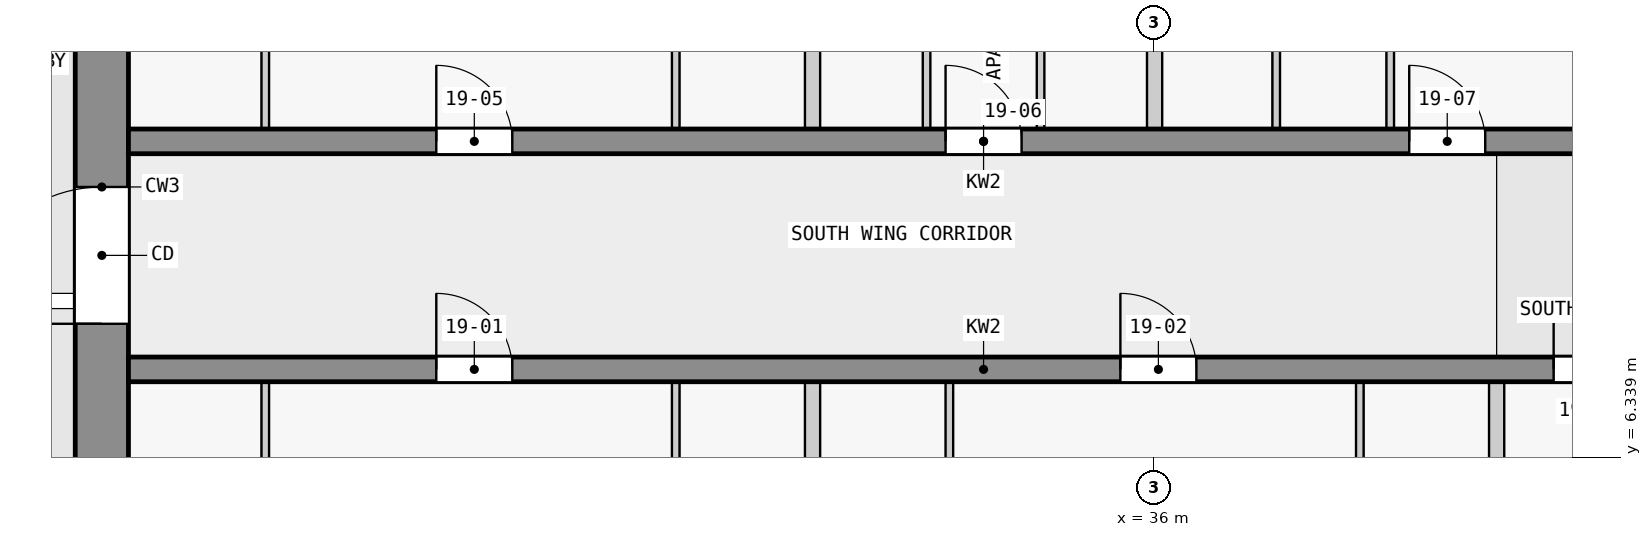
"""IFC4 building model, lengths in metres.
Left out: names, types, materials, properties, quantities, classifications, styles, units other than length and angle.
Written with IfcOpenShell. Run it as: python <this file> out.ifc"""

import sys

from ifc_helpers import new_model, si_unit, direction, frame, frame_2d, origin, place, context, subcontext, project, spatial, rectangle, extrude, element, fill, save


model = new_model("IFC4")
c1 = context("Model", 3, precision=1e-05, world=origin(), true_north=direction((0.0, 1.0)))
c2 = subcontext(c1, "Body", "Model", "MODEL_VIEW")
j1 = project(units=[si_unit("LENGTHUNIT", "METRE"), si_unit("PLANEANGLEUNIT", "RADIAN")], contexts=[c1])
p1 = place(None, origin())
s1 = spatial("IfcSite", under=j1, at=p1, CompositionType="ELEMENT")
p2 = place(p1, origin())
s2 = spatial("IfcBuilding", under=s1, at=p2, CompositionType="ELEMENT")
p3 = place(p2, frame((0.0, 0.0, 78.3)))
s3 = spatial("IfcBuildingStorey", under=s2, at=p3, CompositionType="ELEMENT", Elevation=78.3)
p4 = place(p3, frame((22.15, 2.5, 0.0), z_axis=(0.0, 0.0, 1.0), x_axis=(0.0, 1.0, 0.0)))
e1 = element("IfcWall", 1, at=p4, inside=s3, PredefinedType="SHEAR", context=c2, shape_type="SweptSolid", body=[
    extrude(rectangle(XDim=14.8, YDim=0.7, at=frame_2d((7.4, 0.0))), origin(), (0.0, 0.0, 1.0), 3.25),
])
p5 = place(p4, frame((5.6, 0.0, 0.0)))
e2 = element("IfcOpeningElement", 2, at=p5, cuts=e1, PredefinedType="OPENING", context=c2, shape_type="SweptSolid", body=[
    extrude(rectangle(XDim=1.8, YDim=2.1, at=frame_2d((0.9, 1.05))), frame((0.0, 0.36, 0.0), z_axis=(0.0, -1.0, 0.0), x_axis=(1.0, 0.0, 0.0)), (0.0, 0.0, 1.0), 0.72),
])
p6 = place(p3, frame((22.5, 7.5, 0.0), z_axis=(0.0, 0.0, 1.0), x_axis=(1.0, 0.0, 0.0)))
e3 = element("IfcWall", 3, at=p6, inside=s3, PredefinedType="SHEAR", context=c2, shape_type="SweptSolid", body=[
    extrude(rectangle(XDim=22.5, YDim=0.325, at=frame_2d((11.25, 0.0))), origin(), (0.0, 0.0, 1.0), 3.25),
])
p7 = place(p6, frame((4.05, 0.0, 0.0)))
e4 = element("IfcOpeningElement", 4, at=p7, cuts=e3, PredefinedType="OPENING", context=c2, shape_type="SweptSolid", body=[
    extrude(rectangle(XDim=1.0, YDim=2.1, at=frame_2d((0.5, 1.05))), frame((0.0, 0.172, 0.0), z_axis=(0.0, -1.0, 0.0), x_axis=(1.0, 0.0, 0.0)), (0.0, 0.0, 1.0), 0.345),
])
p8 = place(p6, frame((13.05, 0.0, 0.0)))
e5 = element("IfcOpeningElement", 5, at=p8, cuts=e3, PredefinedType="OPENING", context=c2, shape_type="SweptSolid", body=[
    extrude(rectangle(XDim=1.0, YDim=2.1, at=frame_2d((0.5, 1.05))), frame((0.0, 0.172, 0.0), z_axis=(0.0, -1.0, 0.0), x_axis=(1.0, 0.0, 0.0)), (0.0, 0.0, 1.0), 0.345),
])
p9 = place(p6, frame((18.75, 0.0, 0.0)))
e6 = element("IfcOpeningElement", 6, at=p9, cuts=e3, PredefinedType="OPENING", context=c2, shape_type="SweptSolid", body=[
    extrude(rectangle(XDim=0.9, YDim=2.1, at=frame_2d((0.45, 1.05))), frame((0.0, 0.172, 0.0), z_axis=(0.0, -1.0, 0.0), x_axis=(1.0, 0.0, 0.0)), (0.0, 0.0, 1.0), 0.345),
])
p10 = place(p6, frame((20.95, 0.0, 0.0)))
e7 = element("IfcOpeningElement", 7, at=p10, cuts=e3, PredefinedType="OPENING", context=c2, shape_type="SweptSolid", body=[
    extrude(rectangle(XDim=1.0, YDim=2.1, at=frame_2d((0.5, 1.05))), frame((0.0, 0.172, 0.0), z_axis=(0.0, -1.0, 0.0), x_axis=(1.0, 0.0, 0.0)), (0.0, 0.0, 1.0), 0.345),
])
p11 = place(p3, frame((22.5, 10.5, 0.0), z_axis=(0.0, 0.0, 1.0), x_axis=(1.0, 0.0, 0.0)))
e8 = element("IfcWall", 8, at=p11, inside=s3, PredefinedType="SHEAR", context=c2, shape_type="SweptSolid", body=[
    extrude(rectangle(XDim=22.5, YDim=0.325, at=frame_2d((11.25, 0.0))), origin(), (0.0, 0.0, 1.0), 3.25),
])
p12 = place(p11, frame((4.05, 0.0, 0.0)))
e9 = element("IfcOpeningElement", 9, at=p12, cuts=e8, PredefinedType="OPENING", context=c2, shape_type="SweptSolid", body=[
    extrude(rectangle(XDim=1.0, YDim=2.1, at=frame_2d((0.5, 1.05))), frame((0.0, 0.172, 0.0), z_axis=(0.0, -1.0, 0.0), x_axis=(1.0, 0.0, 0.0)), (0.0, 0.0, 1.0), 0.345),
])
p13 = place(p11, frame((10.75, 0.0, 0.0)))
e10 = element("IfcOpeningElement", 10, at=p13, cuts=e8, PredefinedType="OPENING", context=c2, shape_type="SweptSolid", body=[
    extrude(rectangle(XDim=1.0, YDim=2.1, at=frame_2d((0.5, 1.05))), frame((0.0, 0.172, 0.0), z_axis=(0.0, -1.0, 0.0), x_axis=(1.0, 0.0, 0.0)), (0.0, 0.0, 1.0), 0.345),
])
p14 = place(p11, frame((16.85, 0.0, 0.0)))
e11 = element("IfcOpeningElement", 11, at=p14, cuts=e8, PredefinedType="OPENING", context=c2, shape_type="SweptSolid", body=[
    extrude(rectangle(XDim=1.0, YDim=2.1, at=frame_2d((0.5, 1.05))), frame((0.0, 0.172, 0.0), z_axis=(0.0, -1.0, 0.0), x_axis=(1.0, 0.0, 0.0)), (0.0, 0.0, 1.0), 0.345),
])
p15 = place(p3, frame((24.3, 3.938, 0.0), z_axis=(0.0, 0.0, 1.0), x_axis=(0.0, 1.0, 0.0)))
e12 = element("IfcWall", 12, at=p15, inside=s3, PredefinedType="PARTITIONING", context=c2, shape_type="SweptSolid", body=[
    extrude(rectangle(XDim=3.4, YDim=0.1, at=frame_2d((1.7, 0.0))), origin(), (0.0, 0.0, 1.0), 3.25),
])
p16 = place(p15, frame((1.25, 0.0, 0.0)))
e13 = element("IfcOpeningElement", 13, at=p16, cuts=e12, PredefinedType="OPENING", context=c2, shape_type="SweptSolid", body=[
    extrude(rectangle(XDim=0.9, YDim=2.1, at=frame_2d((0.45, 1.05))), frame((0.0, 0.06, 0.0), z_axis=(0.0, -1.0, 0.0), x_axis=(1.0, 0.0, 0.0)), (0.0, 0.0, 1.0), 0.12),
])
p17 = place(p3, frame((24.3, 10.663, 0.0), z_axis=(0.0, 0.0, 1.0), x_axis=(0.0, 1.0, 0.0)))
e14 = element("IfcWall", 14, at=p17, inside=s3, PredefinedType="PARTITIONING", context=c2, shape_type="SweptSolid", body=[
    extrude(rectangle(XDim=3.4, YDim=0.1, at=frame_2d((1.7, 0.0))), origin(), (0.0, 0.0, 1.0), 3.25),
])
p18 = place(p17, frame((1.25, 0.0, 0.0)))
e15 = element("IfcOpeningElement", 15, at=p18, cuts=e14, PredefinedType="OPENING", context=c2, shape_type="SweptSolid", body=[
    extrude(rectangle(XDim=0.9, YDim=2.1, at=frame_2d((0.45, 1.05))), frame((0.0, 0.06, 0.0), z_axis=(0.0, -1.0, 0.0), x_axis=(1.0, 0.0, 0.0)), (0.0, 0.0, 1.0), 0.12),
])
p19 = place(p3, frame((29.7, 7.337, 0.0), z_axis=(0.0, 0.0, 1.0), x_axis=(0.0, -1.0, 0.0)))
e16 = element("IfcWall", 16, at=p19, inside=s3, PredefinedType="PARTITIONING", context=c2, shape_type="SweptSolid", body=[
    extrude(rectangle(XDim=3.35, YDim=0.1, at=frame_2d((1.675, 0.0))), origin(), (0.0, 0.0, 1.0), 3.25),
])
p20 = place(p19, frame((1.25, 0.0, 0.0)))
e17 = element("IfcOpeningElement", 17, at=p20, cuts=e16, PredefinedType="OPENING", context=c2, shape_type="SweptSolid", body=[
    extrude(rectangle(XDim=0.9, YDim=2.1, at=frame_2d((0.45, 1.05))), frame((0.0, 0.06, 0.0), z_axis=(0.0, -1.0, 0.0), x_axis=(1.0, 0.0, 0.0)), (0.0, 0.0, 1.0), 0.12),
])
p21 = place(p3, frame((29.7, 14.062, 0.0), z_axis=(0.0, 0.0, 1.0), x_axis=(0.0, -1.0, 0.0)))
e18 = element("IfcWall", 18, at=p21, inside=s3, PredefinedType="PARTITIONING", context=c2, shape_type="SweptSolid", body=[
    extrude(rectangle(XDim=3.4, YDim=0.1, at=frame_2d((1.7, 0.0))), origin(), (0.0, 0.0, 1.0), 3.25),
])
p22 = place(p21, frame((1.25, 0.0, 0.0)))
e19 = element("IfcOpeningElement", 19, at=p22, cuts=e18, PredefinedType="OPENING", context=c2, shape_type="SweptSolid", body=[
    extrude(rectangle(XDim=0.9, YDim=2.1, at=frame_2d((0.45, 1.05))), frame((0.0, 0.06, 0.0), z_axis=(0.0, -1.0, 0.0), x_axis=(1.0, 0.0, 0.0)), (0.0, 0.0, 1.0), 0.12),
])
for number, where, z_axis, x_axis in (
    (20, (31.5, 3.938, 0.0), (0.0, 0.0, 1.0), (0.0, 1.0, 0.0)),
    (21, (31.5, 10.663, 0.0), (0.0, 0.0, 1.0), (0.0, 1.0, 0.0)),
):
    element("IfcWall", number, at=place(p3, frame(where, z_axis=z_axis, x_axis=x_axis)), inside=s3, PredefinedType="PARTITIONING", context=c2, shape_type="SweptSolid", body=[
        extrude(rectangle(XDim=3.4, YDim=0.2, at=frame_2d((1.7, 0.0))), origin(), (0.0, 0.0, 1.0), 3.25),
    ])
p23 = place(p3, frame((33.0, 10.663, 0.0), z_axis=(0.0, 0.0, 1.0), x_axis=(0.0, 1.0, 0.0)))
e22 = element("IfcWall", 22, at=p23, inside=s3, PredefinedType="PARTITIONING", context=c2, shape_type="SweptSolid", body=[
    extrude(rectangle(XDim=3.4, YDim=0.1, at=frame_2d((1.7, 0.0))), origin(), (0.0, 0.0, 1.0), 3.25),
])
p24 = place(p23, frame((1.25, 0.0, 0.0)))
e23 = element("IfcOpeningElement", 23, at=p24, cuts=e22, PredefinedType="OPENING", context=c2, shape_type="SweptSolid", body=[
    extrude(rectangle(XDim=0.9, YDim=2.1, at=frame_2d((0.45, 1.05))), frame((0.0, 0.06, 0.0), z_axis=(0.0, -1.0, 0.0), x_axis=(1.0, 0.0, 0.0)), (0.0, 0.0, 1.0), 0.12),
])
p25 = place(p3, frame((33.3, 3.988, 0.0), z_axis=(0.0, 0.0, 1.0), x_axis=(0.0, 1.0, 0.0)))
e24 = element("IfcWall", 24, at=p25, inside=s3, PredefinedType="PARTITIONING", context=c2, shape_type="SweptSolid", body=[
    extrude(rectangle(XDim=3.35, YDim=0.1, at=frame_2d((1.675, 0.0))), origin(), (0.0, 0.0, 1.0), 3.25),
])
p26 = place(p25, frame((1.25, 0.0, 0.0)))
e25 = element("IfcOpeningElement", 25, at=p26, cuts=e24, PredefinedType="OPENING", context=c2, shape_type="SweptSolid", body=[
    extrude(rectangle(XDim=0.9, YDim=2.1, at=frame_2d((0.45, 1.05))), frame((0.0, 0.06, 0.0), z_axis=(0.0, -1.0, 0.0), x_axis=(1.0, 0.0, 0.0)), (0.0, 0.0, 1.0), 0.12),
])
p27 = place(p3, frame((34.5, 14.012, 0.0), z_axis=(0.0, 0.0, 1.0), x_axis=(0.0, -1.0, 0.0)))
e26 = element("IfcWall", 26, at=p27, inside=s3, PredefinedType="PARTITIONING", context=c2, shape_type="SweptSolid", body=[
    extrude(rectangle(XDim=3.35, YDim=0.1, at=frame_2d((1.675, 0.0))), origin(), (0.0, 0.0, 1.0), 3.25),
])
p28 = place(p27, frame((1.25, 0.0, 0.0)))
e27 = element("IfcOpeningElement", 27, at=p28, cuts=e26, PredefinedType="OPENING", context=c2, shape_type="SweptSolid", body=[
    extrude(rectangle(XDim=0.9, YDim=2.1, at=frame_2d((0.45, 1.05))), frame((0.0, 0.06, 0.0), z_axis=(0.0, -1.0, 0.0), x_axis=(1.0, 0.0, 0.0)), (0.0, 0.0, 1.0), 0.12),
])
p29 = place(p3, frame((36.0, 10.663, 0.0), z_axis=(0.0, 0.0, 1.0), x_axis=(0.0, 1.0, 0.0)))
e28 = element("IfcWall", 28, at=p29, inside=s3, PredefinedType="PARTITIONING", context=c2, shape_type="SweptSolid", body=[
    extrude(rectangle(XDim=3.4, YDim=0.2, at=frame_2d((1.7, 0.0))), origin(), (0.0, 0.0, 1.0), 3.25),
])
p30 = place(p3, frame((37.6, 10.663, 0.0), z_axis=(0.0, 0.0, 1.0), x_axis=(0.0, 1.0, 0.0)))
e29 = element("IfcWall", 29, at=p30, inside=s3, PredefinedType="PARTITIONING", context=c2, shape_type="SweptSolid", body=[
    extrude(rectangle(XDim=3.35, YDim=0.1, at=frame_2d((1.675, 0.0))), origin(), (0.0, 0.0, 1.0), 3.25),
])
p31 = place(p3, frame((38.7, 7.337, 0.0), z_axis=(0.0, 0.0, 1.0), x_axis=(0.0, -1.0, 0.0)))
e30 = element("IfcWall", 30, at=p31, inside=s3, PredefinedType="PARTITIONING", context=c2, shape_type="SweptSolid", body=[
    extrude(rectangle(XDim=3.4, YDim=0.1, at=frame_2d((1.7, 0.0))), origin(), (0.0, 0.0, 1.0), 3.25),
])
p32 = place(p31, frame((1.25, 0.0, 0.0)))
e31 = element("IfcOpeningElement", 31, at=p32, cuts=e30, PredefinedType="OPENING", context=c2, shape_type="SweptSolid", body=[
    extrude(rectangle(XDim=0.9, YDim=2.1, at=frame_2d((0.45, 1.05))), frame((0.0, 0.06, 0.0), z_axis=(0.0, -1.0, 0.0), x_axis=(1.0, 0.0, 0.0)), (0.0, 0.0, 1.0), 0.12),
])
p33 = place(p3, frame((39.1, 10.663, 0.0), z_axis=(0.0, 0.0, 1.0), x_axis=(0.0, 1.0, 0.0)))
e32 = element("IfcWall", 32, at=p33, inside=s3, PredefinedType="PARTITIONING", context=c2, shape_type="SweptSolid", body=[
    extrude(rectangle(XDim=3.35, YDim=0.1, at=frame_2d((1.675, 0.0))), origin(), (0.0, 0.0, 1.0), 3.25),
])
p34 = place(p33, frame((1.25, 0.0, 0.0)))
e33 = element("IfcOpeningElement", 33, at=p34, cuts=e32, PredefinedType="OPENING", context=c2, shape_type="SweptSolid", body=[
    extrude(rectangle(XDim=0.9, YDim=2.1, at=frame_2d((0.45, 1.05))), frame((0.0, 0.06, 0.0), z_axis=(0.0, -1.0, 0.0), x_axis=(1.0, 0.0, 0.0)), (0.0, 0.0, 1.0), 0.12),
])
p35 = place(p3, frame((40.5, 1.122, 0.0), z_axis=(0.0, 0.0, 1.0), x_axis=(0.0, 1.0, 0.0)))
e34 = element("IfcWall", 34, at=p35, inside=s3, PredefinedType="PARTITIONING", context=c2, shape_type="SweptSolid", body=[
    extrude(rectangle(XDim=6.215, YDim=0.2, at=frame_2d((3.107, 0.0))), origin(), (0.0, 0.0, 1.0), 3.25),
])
p36 = place(p5, origin())
e35 = element("IfcDoor", 35, at=p36, inside=s3, OperationType="DOUBLE_DOOR_SINGLE_SWING", PredefinedType="DOOR", context=c2, shape_type="SweptSolid", body=[
    extrude(rectangle(XDim=1.8, YDim=2.1, at=frame_2d((0.9, 1.05))), frame((0.0, 0.025, 0.0), z_axis=(0.0, -1.0, 0.0), x_axis=(1.0, 0.0, 0.0)), (0.0, 0.0, 1.0), 0.05),
])
fill(e2, e35)
p37 = place(p7, origin())
e36 = element("IfcDoor", 36, at=p37, inside=s3, OperationType="SINGLE_SWING_LEFT", PredefinedType="DOOR", context=c2, shape_type="SweptSolid", body=[
    extrude(rectangle(XDim=1.0, YDim=2.1, at=frame_2d((0.5, 1.05))), frame((0.0, 0.025, 0.0), z_axis=(0.0, -1.0, 0.0), x_axis=(1.0, 0.0, 0.0)), (0.0, 0.0, 1.0), 0.05),
])
fill(e4, e36)
p38 = place(p8, origin())
e37 = element("IfcDoor", 37, at=p38, inside=s3, OperationType="SINGLE_SWING_RIGHT", PredefinedType="DOOR", context=c2, shape_type="SweptSolid", body=[
    extrude(rectangle(XDim=1.0, YDim=2.1, at=frame_2d((0.5, 1.05))), frame((0.0, 0.025, 0.0), z_axis=(0.0, -1.0, 0.0), x_axis=(1.0, 0.0, 0.0)), (0.0, 0.0, 1.0), 0.05),
])
fill(e5, e37)
p39 = place(p9, origin())
e38 = element("IfcDoor", 38, at=p39, inside=s3, OperationType="SINGLE_SWING_RIGHT", PredefinedType="DOOR", context=c2, shape_type="SweptSolid", body=[
    extrude(rectangle(XDim=0.9, YDim=2.1, at=frame_2d((0.45, 1.05))), frame((0.0, 0.025, 0.0), z_axis=(0.0, -1.0, 0.0), x_axis=(1.0, 0.0, 0.0)), (0.0, 0.0, 1.0), 0.05),
])
fill(e6, e38)
p40 = place(p12, origin())
e39 = element("IfcDoor", 39, at=p40, inside=s3, OperationType="SINGLE_SWING_LEFT", PredefinedType="DOOR", context=c2, shape_type="SweptSolid", body=[
    extrude(rectangle(XDim=1.0, YDim=2.1, at=frame_2d((0.5, 1.05))), frame((0.0, 0.025, 0.0), z_axis=(0.0, -1.0, 0.0), x_axis=(1.0, 0.0, 0.0)), (0.0, 0.0, 1.0), 0.05),
])
fill(e9, e39)
p41 = place(p13, origin())
e40 = element("IfcDoor", 40, at=p41, inside=s3, OperationType="SINGLE_SWING_LEFT", PredefinedType="DOOR", context=c2, shape_type="SweptSolid", body=[
    extrude(rectangle(XDim=1.0, YDim=2.1, at=frame_2d((0.5, 1.05))), frame((0.0, 0.025, 0.0), z_axis=(0.0, -1.0, 0.0), x_axis=(1.0, 0.0, 0.0)), (0.0, 0.0, 1.0), 0.05),
])
fill(e10, e40)
p42 = place(p14, origin())
e41 = element("IfcDoor", 41, at=p42, inside=s3, OperationType="SINGLE_SWING_RIGHT", PredefinedType="DOOR", context=c2, shape_type="SweptSolid", body=[
    extrude(rectangle(XDim=1.0, YDim=2.1, at=frame_2d((0.5, 1.05))), frame((0.0, 0.025, 0.0), z_axis=(0.0, -1.0, 0.0), x_axis=(1.0, 0.0, 0.0)), (0.0, 0.0, 1.0), 0.05),
])
fill(e11, e41)
save(model, sys.argv[1])
